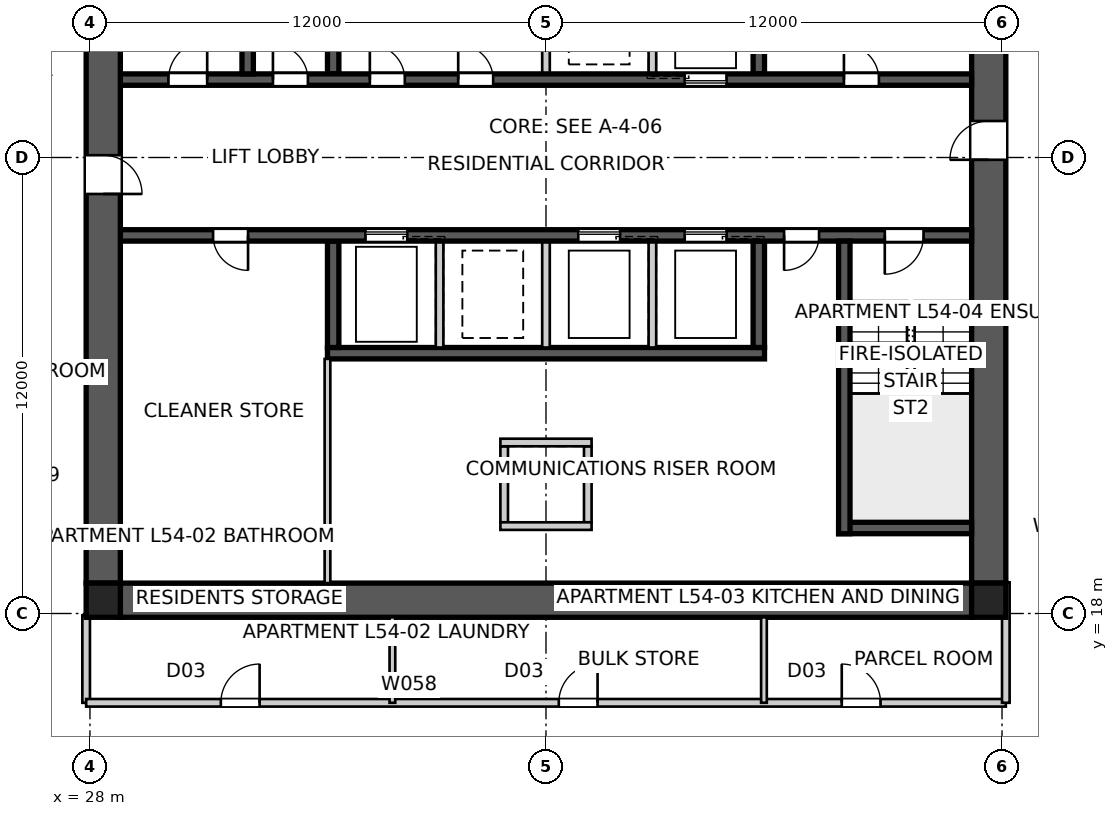
"""IFC4 building model, lengths in metres.
Left out: names, types, materials, properties, quantities, classifications, styles, units other than length and angle.
Written with IfcOpenShell. Run it as: python <this file> out.ifc"""

import sys

from ifc_helpers import new_model, si_unit, direction, frame, frame_2d, origin, origin_2d, place, context, subcontext, project, spatial, polyline, rectangle, outline, extrude, element, fill, save


model = new_model("IFC4")
c1 = context("Model", 3, precision=1e-05, world=origin(), true_north=direction((0.0, 1.0)))
c2 = subcontext(c1, "Body", "Model", "MODEL_VIEW")
j1 = project(units=[si_unit("LENGTHUNIT", "METRE"), si_unit("PLANEANGLEUNIT", "RADIAN")], contexts=[c1])
p1 = place(None, origin())
s1 = spatial("IfcSite", under=j1, at=p1, CompositionType="ELEMENT")
p2 = place(p1, origin())
s2 = spatial("IfcBuilding", under=s1, at=p2, CompositionType="ELEMENT")
p3 = place(p2, frame((0.0, 0.0, 196.4)))
s3 = spatial("IfcBuildingStorey", under=s2, at=p3, CompositionType="ELEMENT", Elevation=196.4)
p4 = place(p3, frame((51.2, 18.35, 0.0), z_axis=(0.0, 0.0, 1.0), x_axis=(-1.0, 0.0, 0.0)))
e1 = element("IfcWall", 1, at=p4, inside=s3, PredefinedType="SHEAR", context=c2, shape_type="SweptSolid", body=[
    extrude(outline(polyline([(0.0, -0.45), (22.4, -0.45), (22.4, -0.025), (22.85, -0.025), (22.85, 0.025), (22.4, 0.025), (22.4, 0.45), (0.0, 0.45), (0.0, 0.025), (-0.45, 0.025), (-0.45, -0.025), (0.0, -0.025), (0.0, -0.45)])), origin(), (0.0, 0.0, 1.0), 3.4),
])
p5 = place(p3, frame((51.65, 18.8, 0.0), z_axis=(0.0, 0.0, 1.0), x_axis=(0.0, 1.0, 0.0)))
e2 = element("IfcWall", 2, at=p5, inside=s3, PredefinedType="SHEAR", context=c2, shape_type="SweptSolid", body=[
    extrude(outline(polyline([(0.0, -0.45), (22.4, -0.45), (22.4, -0.025), (22.85, -0.025), (22.85, 0.025), (22.4, 0.025), (22.4, 0.45), (0.0, 0.45), (0.0, 0.025), (-0.45, 0.025), (-0.45, -0.025), (0.0, -0.025), (0.0, -0.45)])), origin(), (0.0, 0.0, 1.0), 3.4),
])
p6 = place(p5, frame((11.14, 0.0, 0.0)))
e3 = element("IfcOpeningElement", 3, at=p6, cuts=e2, PredefinedType="OPENING", context=c2, shape_type="SweptSolid", body=[
    extrude(rectangle(XDim=1.02, YDim=2.4, at=frame_2d((0.51, 1.2))), frame((0.0, 0.46, 0.0), z_axis=(0.0, -1.0, 0.0), x_axis=(1.0, 0.0, 0.0)), (0.0, 0.0, 1.0), 0.92),
])
p7 = place(p3, frame((28.35, 41.2, 0.0), z_axis=(0.0, 0.0, 1.0), x_axis=(0.0, -1.0, 0.0)))
e4 = element("IfcWall", 4, at=p7, inside=s3, PredefinedType="SHEAR", context=c2, shape_type="SweptSolid", body=[
    extrude(outline(polyline([(0.0, -0.45), (22.4, -0.45), (22.4, -0.025), (22.85, -0.025), (22.85, 0.025), (22.4, 0.025), (22.4, 0.45), (0.0, 0.45), (0.0, 0.025), (-0.45, 0.025), (-0.45, -0.025), (0.0, -0.025), (0.0, -0.45)])), origin(), (0.0, 0.0, 1.0), 3.4),
])
p8 = place(p7, frame((11.14, 0.0, 0.0)))
e5 = element("IfcOpeningElement", 5, at=p8, cuts=e4, PredefinedType="OPENING", context=c2, shape_type="SweptSolid", body=[
    extrude(rectangle(XDim=1.02, YDim=2.4, at=frame_2d((0.51, 1.2))), frame((0.0, 0.46, 0.0), z_axis=(0.0, -1.0, 0.0), x_axis=(1.0, 0.0, 0.0)), (0.0, 0.0, 1.0), 0.92),
])
p9 = place(p3, frame((28.8, 32.05, 0.0), z_axis=(0.0, 0.0, 1.0), x_axis=(1.0, 0.0, 0.0)))
e6 = element("IfcWall", 6, at=p9, inside=s3, PredefinedType="SHEAR", context=c2, shape_type="SweptSolid", body=[
    extrude(rectangle(XDim=22.4, YDim=0.3, at=frame_2d((11.2, 0.0))), origin(), (0.0, 0.0, 1.0), 3.4),
])
p10 = place(p9, frame((19.04, 0.0, 0.0)))
e7 = element("IfcOpeningElement", 7, at=p10, cuts=e6, PredefinedType="OPENING", context=c2, shape_type="SweptSolid", body=[
    extrude(rectangle(XDim=0.92, YDim=2.1, at=frame_2d((0.46, 1.05))), frame((0.0, 0.16, 0.0), z_axis=(0.0, -1.0, 0.0), x_axis=(1.0, 0.0, 0.0)), (0.0, 0.0, 1.0), 0.32),
])
p11 = place(p9, frame((1.265, 0.0, 0.0)))
e8 = element("IfcOpeningElement", 8, at=p11, cuts=e6, PredefinedType="OPENING", context=c2, shape_type="SweptSolid", body=[
    extrude(rectangle(XDim=1.02, YDim=2.1, at=frame_2d((0.51, 1.05))), frame((0.0, 0.16, 0.0), z_axis=(0.0, -1.0, 0.0), x_axis=(1.0, 0.0, 0.0)), (0.0, 0.0, 1.0), 0.32),
])
p12 = place(p9, frame((4.015, 0.0, 0.0)))
e9 = element("IfcOpeningElement", 9, at=p12, cuts=e6, PredefinedType="OPENING", context=c2, shape_type="SweptSolid", body=[
    extrude(rectangle(XDim=0.92, YDim=2.1, at=frame_2d((0.46, 1.05))), frame((0.0, 0.16, 0.0), z_axis=(0.0, -1.0, 0.0), x_axis=(1.0, 0.0, 0.0)), (0.0, 0.0, 1.0), 0.32),
])
p13 = place(p9, frame((6.565, 0.0, 0.0)))
e10 = element("IfcOpeningElement", 10, at=p13, cuts=e6, PredefinedType="OPENING", context=c2, shape_type="SweptSolid", body=[
    extrude(rectangle(XDim=0.92, YDim=2.1, at=frame_2d((0.46, 1.05))), frame((0.0, 0.16, 0.0), z_axis=(0.0, -1.0, 0.0), x_axis=(1.0, 0.0, 0.0)), (0.0, 0.0, 1.0), 0.32),
])
p14 = place(p9, frame((8.89, 0.0, 0.0)))
e11 = element("IfcOpeningElement", 11, at=p14, cuts=e6, PredefinedType="OPENING", context=c2, shape_type="SweptSolid", body=[
    extrude(rectangle(XDim=0.92, YDim=2.1, at=frame_2d((0.46, 1.05))), frame((0.0, 0.16, 0.0), z_axis=(0.0, -1.0, 0.0), x_axis=(1.0, 0.0, 0.0)), (0.0, 0.0, 1.0), 0.32),
])
p15 = place(p9, frame((14.85, 0.0, 0.0)))
e12 = element("IfcOpeningElement", 12, at=p15, cuts=e6, PredefinedType="OPENING", context=c2, shape_type="SweptSolid", body=[
    extrude(rectangle(XDim=1.1, YDim=2.1, at=frame_2d((0.55, 1.05))), frame((0.0, 0.16, 0.0), z_axis=(0.0, -1.0, 0.0), x_axis=(1.0, 0.0, 0.0)), (0.0, 0.0, 1.0), 0.32),
])
p16 = place(p3, frame((51.2, 27.95, 0.0), z_axis=(0.0, 0.0, 1.0), x_axis=(-1.0, 0.0, 0.0)))
e13 = element("IfcWall", 13, at=p16, inside=s3, PredefinedType="SHEAR", context=c2, shape_type="SweptSolid", body=[
    extrude(rectangle(XDim=22.4, YDim=0.3, at=frame_2d((11.2, 0.0))), origin(), (0.0, 0.0, 1.0), 3.4),
])
p17 = place(p16, frame((19.04, 0.0, 0.0)))
e14 = element("IfcOpeningElement", 14, at=p17, cuts=e13, PredefinedType="OPENING", context=c2, shape_type="SweptSolid", body=[
    extrude(rectangle(XDim=0.92, YDim=2.1, at=frame_2d((0.46, 1.05))), frame((0.0, 0.16, 0.0), z_axis=(0.0, -1.0, 0.0), x_axis=(1.0, 0.0, 0.0)), (0.0, 0.0, 1.0), 0.32),
])
p18 = place(p16, frame((1.265, 0.0, 0.0)))
e15 = element("IfcOpeningElement", 15, at=p18, cuts=e13, PredefinedType="OPENING", context=c2, shape_type="SweptSolid", body=[
    extrude(rectangle(XDim=1.02, YDim=2.1, at=frame_2d((0.51, 1.05))), frame((0.0, 0.16, 0.0), z_axis=(0.0, -1.0, 0.0), x_axis=(1.0, 0.0, 0.0)), (0.0, 0.0, 1.0), 0.32),
])
p19 = place(p16, frame((4.015, 0.0, 0.0)))
e16 = element("IfcOpeningElement", 16, at=p19, cuts=e13, PredefinedType="OPENING", context=c2, shape_type="SweptSolid", body=[
    extrude(rectangle(XDim=0.92, YDim=2.1, at=frame_2d((0.46, 1.05))), frame((0.0, 0.16, 0.0), z_axis=(0.0, -1.0, 0.0), x_axis=(1.0, 0.0, 0.0)), (0.0, 0.0, 1.0), 0.32),
])
p20 = place(p16, frame((6.45, 0.0, 0.0)))
e17 = element("IfcOpeningElement", 17, at=p20, cuts=e13, PredefinedType="OPENING", context=c2, shape_type="SweptSolid", body=[
    extrude(rectangle(XDim=1.1, YDim=2.1, at=frame_2d((0.55, 1.05))), frame((0.0, 0.16, 0.0), z_axis=(0.0, -1.0, 0.0), x_axis=(1.0, 0.0, 0.0)), (0.0, 0.0, 1.0), 0.32),
])
p21 = place(p16, frame((9.25, 0.0, 0.0)))
e18 = element("IfcOpeningElement", 18, at=p21, cuts=e13, PredefinedType="OPENING", context=c2, shape_type="SweptSolid", body=[
    extrude(rectangle(XDim=1.1, YDim=2.1, at=frame_2d((0.55, 1.05))), frame((0.0, 0.16, 0.0), z_axis=(0.0, -1.0, 0.0), x_axis=(1.0, 0.0, 0.0)), (0.0, 0.0, 1.0), 0.32),
])
p22 = place(p16, frame((14.85, 0.0, 0.0)))
e19 = element("IfcOpeningElement", 19, at=p22, cuts=e13, PredefinedType="OPENING", context=c2, shape_type="SweptSolid", body=[
    extrude(rectangle(XDim=1.1, YDim=2.1, at=frame_2d((0.55, 1.05))), frame((0.0, 0.16, 0.0), z_axis=(0.0, -1.0, 0.0), x_axis=(1.0, 0.0, 0.0)), (0.0, 0.0, 1.0), 0.32),
])
p23 = place(p3, frame((45.75, 24.85, 0.0), z_axis=(0.0, 0.0, 1.0), x_axis=(-1.0, 0.0, 0.0)))
e20 = element("IfcWall", 20, at=p23, inside=s3, PredefinedType="SHEAR", context=c2, shape_type="SweptSolid", body=[
    extrude(rectangle(XDim=11.5, YDim=0.3, at=frame_2d((5.75, 0.0))), origin(), (0.0, 0.0, 1.0), 3.4),
])
for number, where, z_axis, x_axis in (
    (21, (34.4, 32.2, 0.0), (0.0, 0.0, 1.0), (0.0, 1.0, 0.0)),
    (22, (45.6, 27.8, 0.0), (0.0, 0.0, 1.0), (0.0, -1.0, 0.0)),
):
    element("IfcWall", number, at=place(p3, frame(where, z_axis=z_axis, x_axis=x_axis)), inside=s3, PredefinedType="SHEAR", context=c2, shape_type="SweptSolid", body=[
        extrude(rectangle(XDim=2.8, YDim=0.3, at=frame_2d((1.4, 0.0))), origin(), (0.0, 0.0, 1.0), 3.4),
    ])
for number, where, z_axis, x_axis in (
    (23, (42.8, 27.8, 0.0), (0.0, 0.0, 1.0), (0.0, -1.0, 0.0)),
    (24, (40.0, 32.2, 0.0), (0.0, 0.0, 1.0), (0.0, 1.0, 0.0)),
    (25, (40.0, 27.8, 0.0), (0.0, 0.0, 1.0), (0.0, -1.0, 0.0)),
    (26, (42.8, 32.2, 0.0), (0.0, 0.0, 1.0), (0.0, 1.0, 0.0)),
    (27, (37.2, 27.8, 0.0), (0.0, 0.0, 1.0), (0.0, -1.0, 0.0)),
):
    element("IfcWall", number, at=place(p3, frame(where, z_axis=z_axis, x_axis=x_axis)), inside=s3, PredefinedType="SOLIDWALL", context=c2, shape_type="SweptSolid", body=[
        extrude(rectangle(XDim=2.8, YDim=0.2, at=frame_2d((1.4, 0.0))), origin(), (0.0, 0.0, 1.0), 3.4),
    ])
for number, where, z_axis, x_axis in (
    (28, (45.6, 32.2, 0.0), (0.0, 0.0, 1.0), (0.0, 1.0, 0.0)),
    (29, (34.4, 27.8, 0.0), (0.0, 0.0, 1.0), (0.0, -1.0, 0.0)),
):
    element("IfcWall", number, at=place(p3, frame(where, z_axis=z_axis, x_axis=x_axis)), inside=s3, PredefinedType="SHEAR", context=c2, shape_type="SweptSolid", body=[
        extrude(rectangle(XDim=2.8, YDim=0.3, at=frame_2d((1.4, 0.0))), origin(), (0.0, 0.0, 1.0), 3.4),
    ])
for number, where, z_axis, x_axis in (
    (30, (32.15, 32.2, 0.0), (0.0, 0.0, 1.0), (0.0, 1.0, 0.0)),
    (31, (47.85, 27.8, 0.0), (0.0, 0.0, 1.0), (0.0, -1.0, 0.0)),
):
    element("IfcWall", number, at=place(p3, frame(where, z_axis=z_axis, x_axis=x_axis)), inside=s3, PredefinedType="SHEAR", context=c2, shape_type="SweptSolid", body=[
        extrude(rectangle(XDim=7.7, YDim=0.3, at=frame_2d((3.85, 0.0))), origin(), (0.0, 0.0, 1.0), 3.4),
    ])
p24 = place(p3, frame((51.2, 20.25, 0.0), z_axis=(0.0, 0.0, 1.0), x_axis=(-1.0, 0.0, 0.0)))
e32 = element("IfcWall", 32, at=p24, inside=s3, PredefinedType="SHEAR", context=c2, shape_type="SweptSolid", body=[
    extrude(rectangle(XDim=3.5, YDim=0.3, at=frame_2d((1.75, 0.0))), origin(), (0.0, 0.0, 1.0), 3.4),
])
for number, where, z_axis, x_axis in (
    (33, (38.9, 22.4, 0.0), (0.0, 0.0, 1.0), (0.0, -1.0, 0.0)),
    (34, (41.1, 22.4, 0.0), (0.0, 0.0, 1.0), (0.0, -1.0, 0.0)),
):
    element("IfcWall", number, at=place(p3, frame(where, z_axis=z_axis, x_axis=x_axis)), inside=s3, PredefinedType="SOLIDWALL", context=c2, shape_type="SweptSolid", body=[
        extrude(rectangle(XDim=2.0, YDim=0.2, at=frame_2d((1.0, 0.0))), origin(), (0.0, 0.0, 1.0), 3.4),
    ])
for number, where, z_axis, x_axis in (
    (35, (38.8, 22.5, 0.0), (0.0, 0.0, 1.0), (1.0, 0.0, 0.0)),
    (36, (38.8, 20.3, 0.0), (0.0, 0.0, 1.0), (1.0, 0.0, 0.0)),
):
    element("IfcWall", number, at=place(p3, frame(where, z_axis=z_axis, x_axis=x_axis)), inside=s3, PredefinedType="SOLIDWALL", context=c2, shape_type="SweptSolid", body=[
        extrude(rectangle(XDim=2.4, YDim=0.2, at=frame_2d((1.2, 0.0))), origin(), (0.0, 0.0, 1.0), 3.4),
    ])
for number, where, z_axis, x_axis in (
    (37, (28.35, 18.35, 0.0), (0.0, 0.0, 1.0), (1.0, 0.0, 0.0)),
    (38, (51.65, 18.35, 0.0), (0.0, 0.0, 1.0), (1.0, 0.0, 0.0)),
):
    element("IfcColumn", number, at=place(p3, frame(where, z_axis=z_axis, x_axis=x_axis)), inside=s3, PredefinedType="COLUMN", context=c2, shape_type="SweptSolid", body=[
        extrude(rectangle(XDim=0.9, YDim=0.9, at=origin_2d()), origin(), (0.0, 0.0, 1.0), 3.4),
    ])
p25 = place(p3, frame((34.25, 18.8, 0.0), z_axis=(0.0, 0.0, 1.0), x_axis=(0.0, 1.0, 0.0)))
e39 = element("IfcWall", 39, at=p25, inside=s3, PredefinedType="SOLIDWALL", context=c2, shape_type="SweptSolid", body=[
    extrude(rectangle(XDim=5.9, YDim=0.15, at=frame_2d((2.95, 0.0))), origin(), (0.0, 0.0, 1.0), 3.25),
])
p26 = place(p3, frame((27.9, 17.95, 0.0), z_axis=(0.0, 0.0, 1.0), x_axis=(0.0, -1.0, 0.0)))
e40 = element("IfcWall", 40, at=p26, inside=s3, PredefinedType="PARTITIONING", context=c2, shape_type="SweptSolid", body=[
    extrude(rectangle(XDim=2.3, YDim=0.2, at=frame_2d((1.15, 0.0))), origin(), (0.0, 0.0, 1.0), 3.25),
])
p27 = place(p3, frame((27.9, 15.65, 0.0), z_axis=(0.0, 0.0, 1.0), x_axis=(1.0, 0.0, 0.0)))
e41 = element("IfcWall", 41, at=p27, inside=s3, PredefinedType="PARTITIONING", context=c2, shape_type="SweptSolid", body=[
    extrude(rectangle(XDim=24.2, YDim=0.2, at=frame_2d((12.1, 0.0))), origin(), (0.0, 0.0, 1.0), 3.25),
])
p28 = place(p27, frame((12.437, 0.0, 0.0)))
e42 = element("IfcOpeningElement", 42, at=p28, cuts=e41, PredefinedType="OPENING", context=c2, shape_type="SweptSolid", body=[
    extrude(rectangle(XDim=1.02, YDim=2.1, at=frame_2d((0.51, 1.05))), frame((0.0, 0.11, 0.0), z_axis=(0.0, -1.0, 0.0), x_axis=(1.0, 0.0, 0.0)), (0.0, 0.0, 1.0), 0.22),
])
p29 = place(p27, frame((3.544, 0.0, 0.0)))
e43 = element("IfcOpeningElement", 43, at=p29, cuts=e41, PredefinedType="OPENING", context=c2, shape_type="SweptSolid", body=[
    extrude(rectangle(XDim=1.02, YDim=2.1, at=frame_2d((0.51, 1.05))), frame((0.0, 0.11, 0.0), z_axis=(0.0, -1.0, 0.0), x_axis=(1.0, 0.0, 0.0)), (0.0, 0.0, 1.0), 0.22),
])
p30 = place(p27, frame((19.883, 0.0, 0.0)))
e44 = element("IfcOpeningElement", 44, at=p30, cuts=e41, PredefinedType="OPENING", context=c2, shape_type="SweptSolid", body=[
    extrude(rectangle(XDim=1.02, YDim=2.1, at=frame_2d((0.51, 1.05))), frame((0.0, 0.11, 0.0), z_axis=(0.0, -1.0, 0.0), x_axis=(1.0, 0.0, 0.0)), (0.0, 0.0, 1.0), 0.22),
])
p31 = place(p3, frame((52.1, 15.65, 0.0), z_axis=(0.0, 0.0, 1.0), x_axis=(0.0, 1.0, 0.0)))
e45 = element("IfcWall", 45, at=p31, inside=s3, PredefinedType="PARTITIONING", context=c2, shape_type="SweptSolid", body=[
    extrude(rectangle(XDim=3.17, YDim=0.2, at=frame_2d((1.585, 0.0))), origin(), (0.0, 0.0, 1.0), 3.25),
])
p32 = place(p3, frame((35.958, 15.65, 0.0), z_axis=(0.0, 0.0, 1.0), x_axis=(0.0, 1.0, 0.0)))
e46 = element("IfcWall", 46, at=p32, inside=s3, PredefinedType="SOLIDWALL", context=c2, shape_type="SweptSolid", body=[
    extrude(rectangle(XDim=2.25, YDim=0.15, at=frame_2d((1.125, 0.0))), origin(), (0.0, 0.0, 1.0), 3.25),
])
p33 = place(p3, frame((45.735, 15.65, 0.0), z_axis=(0.0, 0.0, 1.0), x_axis=(0.0, 1.0, 0.0)))
e47 = element("IfcWall", 47, at=p33, inside=s3, PredefinedType="SOLIDWALL", context=c2, shape_type="SweptSolid", body=[
    extrude(rectangle(XDim=2.25, YDim=0.15, at=frame_2d((1.125, 0.0))), origin(), (0.0, 0.0, 1.0), 2.796),
])
p34 = place(p10, origin())
e48 = element("IfcDoor", 48, at=p34, inside=s3, OperationType="SINGLE_SWING_LEFT", PredefinedType="DOOR", context=c2, shape_type="SweptSolid", body=[
    extrude(rectangle(XDim=0.92, YDim=2.1, at=frame_2d((0.46, 1.05))), frame((0.0, 0.025, 0.0), z_axis=(0.0, -1.0, 0.0), x_axis=(1.0, 0.0, 0.0)), (0.0, 0.0, 1.0), 0.05),
])
fill(e7, e48)
p35 = place(p17, origin())
e49 = element("IfcDoor", 49, at=p35, inside=s3, OperationType="SINGLE_SWING_LEFT", PredefinedType="DOOR", context=c2, shape_type="SweptSolid", body=[
    extrude(rectangle(XDim=0.92, YDim=2.1, at=frame_2d((0.46, 1.05))), frame((0.0, 0.025, 0.0), z_axis=(0.0, -1.0, 0.0), x_axis=(1.0, 0.0, 0.0)), (0.0, 0.0, 1.0), 0.05),
])
fill(e14, e49)
p36 = place(p18, origin())
e50 = element("IfcDoor", 50, at=p36, inside=s3, OperationType="SINGLE_SWING_RIGHT", PredefinedType="DOOR", context=c2, shape_type="SweptSolid", body=[
    extrude(rectangle(XDim=1.02, YDim=2.1, at=frame_2d((0.51, 1.05))), frame((0.0, 0.025, 0.0), z_axis=(0.0, -1.0, 0.0), x_axis=(1.0, 0.0, 0.0)), (0.0, 0.0, 1.0), 0.05),
])
fill(e15, e50)
p37 = place(p11, origin())
e51 = element("IfcDoor", 51, at=p37, inside=s3, OperationType="SINGLE_SWING_RIGHT", PredefinedType="DOOR", context=c2, shape_type="SweptSolid", body=[
    extrude(rectangle(XDim=1.02, YDim=2.1, at=frame_2d((0.51, 1.05))), frame((0.0, 0.025, 0.0), z_axis=(0.0, -1.0, 0.0), x_axis=(1.0, 0.0, 0.0)), (0.0, 0.0, 1.0), 0.05),
])
fill(e8, e51)
p38 = place(p12, origin())
e52 = element("IfcDoor", 52, at=p38, inside=s3, OperationType="SINGLE_SWING_LEFT", PredefinedType="DOOR", context=c2, shape_type="SweptSolid", body=[
    extrude(rectangle(XDim=0.92, YDim=2.1, at=frame_2d((0.46, 1.05))), frame((0.0, 0.025, 0.0), z_axis=(0.0, -1.0, 0.0), x_axis=(1.0, 0.0, 0.0)), (0.0, 0.0, 1.0), 0.05),
])
fill(e9, e52)
p39 = place(p19, origin())
e53 = element("IfcDoor", 53, at=p39, inside=s3, OperationType="SINGLE_SWING_RIGHT", PredefinedType="DOOR", context=c2, shape_type="SweptSolid", body=[
    extrude(rectangle(XDim=0.92, YDim=2.1, at=frame_2d((0.46, 1.05))), frame((0.0, 0.025, 0.0), z_axis=(0.0, -1.0, 0.0), x_axis=(1.0, 0.0, 0.0)), (0.0, 0.0, 1.0), 0.05),
])
fill(e16, e53)
p40 = place(p28, origin())
e54 = element("IfcDoor", 54, at=p40, inside=s3, OperationType="SINGLE_SWING_RIGHT", PredefinedType="DOOR", context=c2, shape_type="SweptSolid", body=[
    extrude(rectangle(XDim=1.02, YDim=2.1, at=frame_2d((0.51, 1.05))), frame((0.0, 0.025, 0.0), z_axis=(0.0, -1.0, 0.0), x_axis=(1.0, 0.0, 0.0)), (0.0, 0.0, 1.0), 0.05),
])
fill(e42, e54)
p41 = place(p29, origin())
e55 = element("IfcDoor", 55, at=p41, inside=s3, OperationType="SINGLE_SWING_RIGHT", PredefinedType="DOOR", context=c2, shape_type="SweptSolid", body=[
    extrude(rectangle(XDim=1.02, YDim=2.1, at=frame_2d((0.51, 1.05))), frame((0.0, 0.025, 0.0), z_axis=(0.0, -1.0, 0.0), x_axis=(1.0, 0.0, 0.0)), (0.0, 0.0, 1.0), 0.05),
])
fill(e43, e55)
p42 = place(p30, origin())
e56 = element("IfcDoor", 56, at=p42, inside=s3, OperationType="SINGLE_SWING_LEFT", PredefinedType="DOOR", context=c2, shape_type="SweptSolid", body=[
    extrude(rectangle(XDim=1.02, YDim=2.1, at=frame_2d((0.51, 1.05))), frame((0.0, 0.025, 0.0), z_axis=(0.0, -1.0, 0.0), x_axis=(1.0, 0.0, 0.0)), (0.0, 0.0, 1.0), 0.05),
])
fill(e44, e56)
p43 = place(p13, origin())
e57 = element("IfcDoor", 57, at=p43, inside=s3, OperationType="SINGLE_SWING_LEFT", PredefinedType="DOOR", context=c2, shape_type="SweptSolid", body=[
    extrude(rectangle(XDim=0.92, YDim=2.1, at=frame_2d((0.46, 1.05))), frame((0.0, 0.025, 0.0), z_axis=(0.0, -1.0, 0.0), x_axis=(1.0, 0.0, 0.0)), (0.0, 0.0, 1.0), 0.05),
])
fill(e10, e57)
p44 = place(p14, origin())
e58 = element("IfcDoor", 58, at=p44, inside=s3, OperationType="SINGLE_SWING_LEFT", PredefinedType="DOOR", context=c2, shape_type="SweptSolid", body=[
    extrude(rectangle(XDim=0.92, YDim=2.1, at=frame_2d((0.46, 1.05))), frame((0.0, 0.025, 0.0), z_axis=(0.0, -1.0, 0.0), x_axis=(1.0, 0.0, 0.0)), (0.0, 0.0, 1.0), 0.05),
])
fill(e11, e58)
p45 = place(p6, origin())
e59 = element("IfcDoor", 59, at=p45, inside=s3, OperationType="SINGLE_SWING_LEFT", PredefinedType="DOOR", context=c2, shape_type="SweptSolid", body=[
    extrude(rectangle(XDim=1.02, YDim=2.4, at=frame_2d((0.51, 1.2))), frame((0.0, 0.025, 0.0), z_axis=(0.0, -1.0, 0.0), x_axis=(1.0, 0.0, 0.0)), (0.0, 0.0, 1.0), 0.05),
])
fill(e3, e59)
p46 = place(p8, origin())
e60 = element("IfcDoor", 60, at=p46, inside=s3, OperationType="SINGLE_SWING_RIGHT", PredefinedType="DOOR", context=c2, shape_type="SweptSolid", body=[
    extrude(rectangle(XDim=1.02, YDim=2.4, at=frame_2d((0.51, 1.2))), frame((0.0, 0.025, 0.0), z_axis=(0.0, -1.0, 0.0), x_axis=(1.0, 0.0, 0.0)), (0.0, 0.0, 1.0), 0.05),
])
fill(e5, e60)
p47 = place(p20, origin())
e61 = element("IfcDoor", 61, at=p47, inside=s3, OperationType="SLIDING_TO_LEFT", PredefinedType="DOOR", context=c2, shape_type="SweptSolid", body=[
    extrude(rectangle(XDim=1.1, YDim=2.1, at=frame_2d((0.55, 1.05))), frame((0.0, 0.025, 0.0), z_axis=(0.0, -1.0, 0.0), x_axis=(1.0, 0.0, 0.0)), (0.0, 0.0, 1.0), 0.05),
])
fill(e17, e61)
p48 = place(p21, origin())
e62 = element("IfcDoor", 62, at=p48, inside=s3, OperationType="SLIDING_TO_LEFT", PredefinedType="DOOR", context=c2, shape_type="SweptSolid", body=[
    extrude(rectangle(XDim=1.1, YDim=2.1, at=frame_2d((0.55, 1.05))), frame((0.0, 0.025, 0.0), z_axis=(0.0, -1.0, 0.0), x_axis=(1.0, 0.0, 0.0)), (0.0, 0.0, 1.0), 0.05),
])
fill(e18, e62)
p49 = place(p15, origin())
e63 = element("IfcDoor", 63, at=p49, inside=s3, OperationType="SLIDING_TO_LEFT", PredefinedType="DOOR", context=c2, shape_type="SweptSolid", body=[
    extrude(rectangle(XDim=1.1, YDim=2.1, at=frame_2d((0.55, 1.05))), frame((0.0, 0.025, 0.0), z_axis=(0.0, -1.0, 0.0), x_axis=(1.0, 0.0, 0.0)), (0.0, 0.0, 1.0), 0.05),
])
fill(e12, e63)
p50 = place(p22, origin())
e64 = element("IfcDoor", 64, at=p50, inside=s3, OperationType="SLIDING_TO_LEFT", PredefinedType="DOOR", context=c2, shape_type="SweptSolid", body=[
    extrude(rectangle(XDim=1.1, YDim=2.1, at=frame_2d((0.55, 1.05))), frame((0.0, 0.025, 0.0), z_axis=(0.0, -1.0, 0.0), x_axis=(1.0, 0.0, 0.0)), (0.0, 0.0, 1.0), 0.05),
])
fill(e19, e64)
save(model, sys.argv[1])
